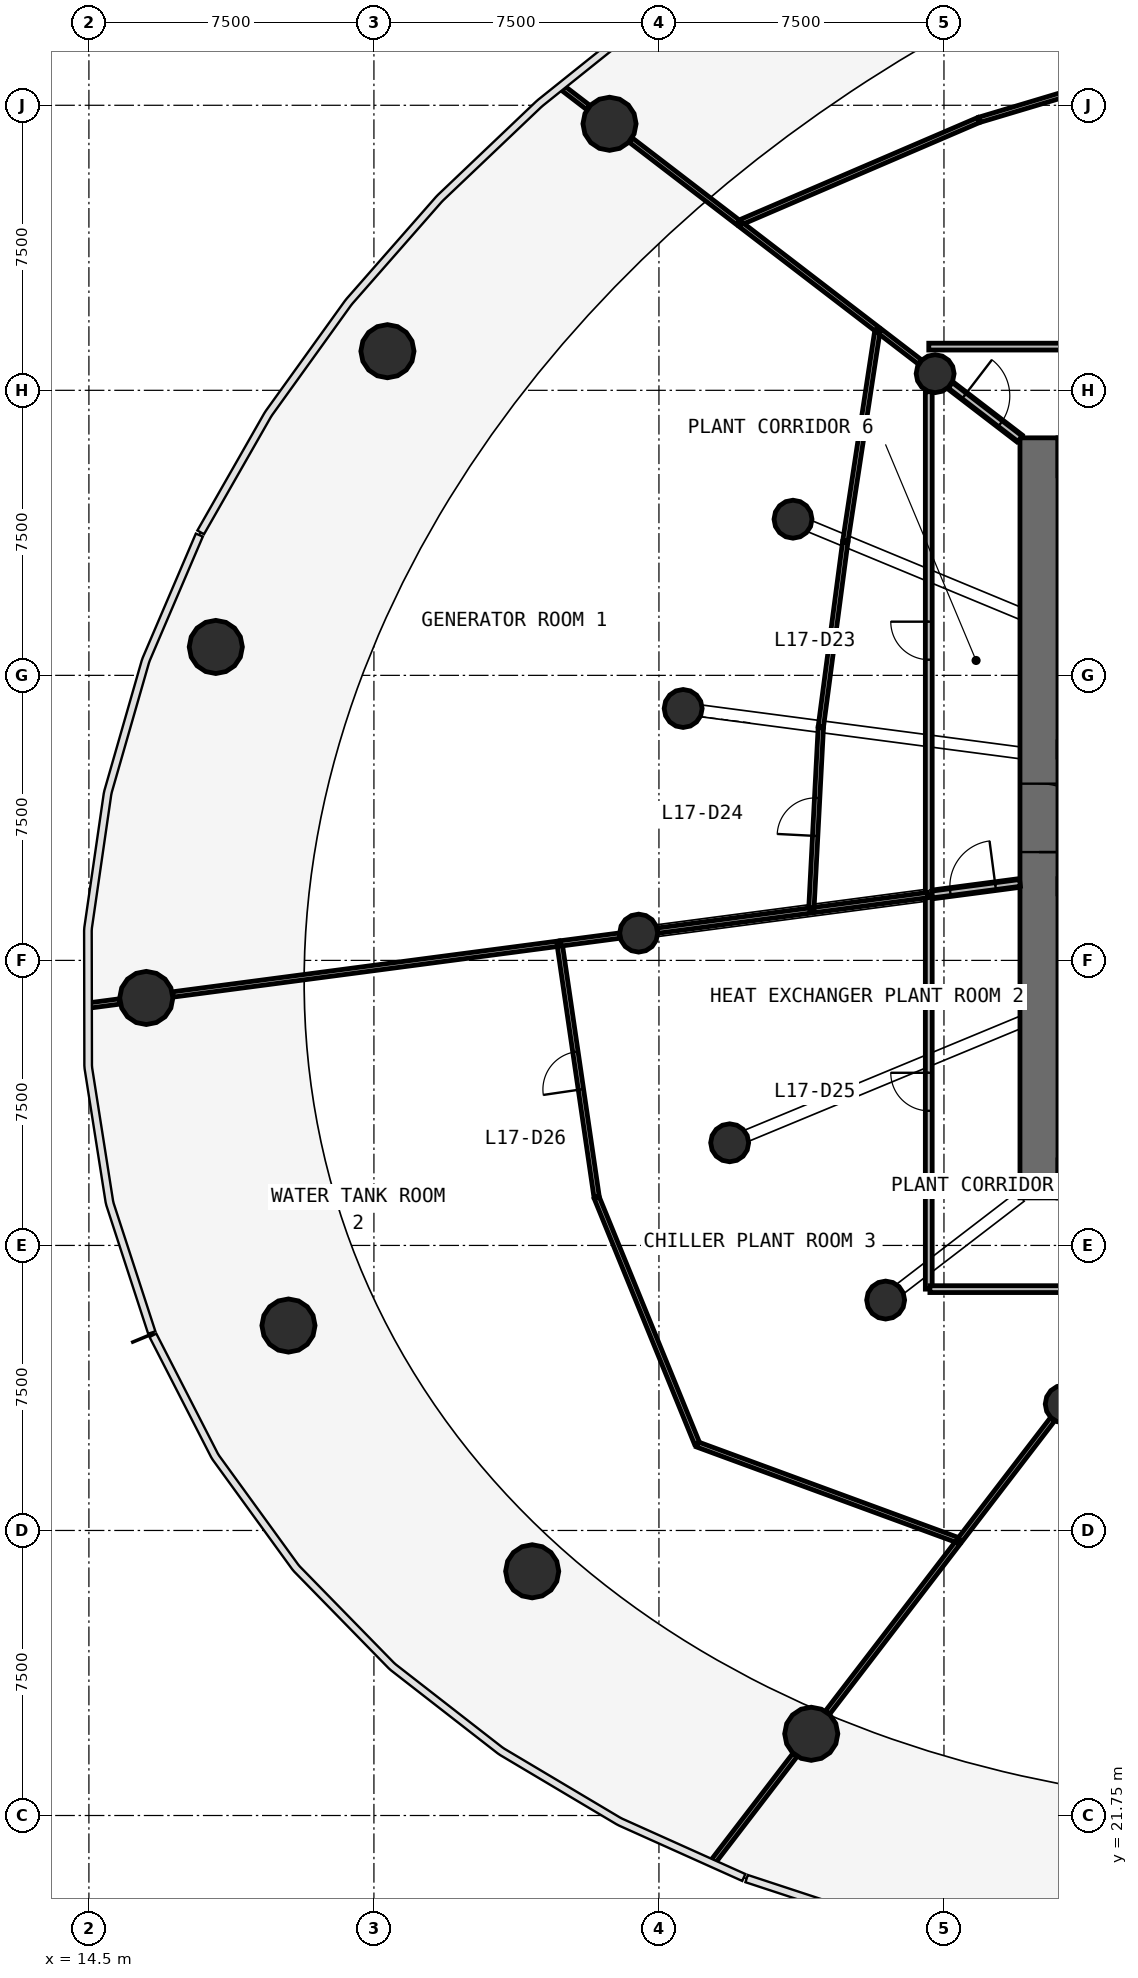
"""IFC4 building model, lengths in metres.
Left out: names, types, materials, properties, quantities, classifications, styles, units other than length and angle.
Written with IfcOpenShell. Run it as: python <this file> out.ifc"""

import sys

from ifc_helpers import new_model, si_unit, direction, frame, frame_2d, origin, origin_2d, place, context, subcontext, project, spatial, rectangle, circle, extrude, source, transform, mapped, element, fill, save


model = new_model("IFC4")
c1 = context("Model", 3, precision=1e-05, world=origin(), true_north=direction((0.0, 1.0)))
c2 = subcontext(c1, "Body", "Model", "MODEL_VIEW")
j1 = project(units=[si_unit("LENGTHUNIT", "METRE"), si_unit("PLANEANGLEUNIT", "RADIAN")], contexts=[c1])
p1 = place(None, origin())
s1 = spatial("IfcSite", under=j1, at=p1, CompositionType="ELEMENT")
p2 = place(p1, origin())
s2 = spatial("IfcBuilding", under=s1, at=p2, CompositionType="ELEMENT")
p3 = place(p2, frame((0.0, 0.0, 75.4)))
s3 = spatial("IfcBuildingStorey", under=s2, at=p3, CompositionType="ELEMENT", Elevation=75.4)
p4 = place(p3, frame((39.5, 58.0, 0.0), z_axis=(0.0, 0.0, 1.0), x_axis=(0.0, -1.0, 0.0)))
e1 = element("IfcWall", 1, at=p4, inside=s3, PredefinedType="SHEAR", context=c2, shape_type="SweptSolid", body=[
    extrude(rectangle(XDim=20.0, YDim=1.0, at=frame_2d((10.0, 0.0))), origin(), (0.0, 0.0, 1.0), 4.4),
])
p5 = place(p4, frame((9.1, 0.0, 0.0)))
e2 = element("IfcOpeningElement", 2, at=p5, cuts=e1, PredefinedType="OPENING", context=c2, shape_type="SweptSolid", body=[
    extrude(rectangle(XDim=1.8, YDim=2.1, at=frame_2d((0.9, 1.05))), frame((0.0, 0.51, 0.0), z_axis=(0.0, -1.0, 0.0), x_axis=(1.0, 0.0, 0.0)), (0.0, 0.0, 1.0), 1.02),
])
m1 = source(origin(), c2, "Body", "SweptSolid", [
    extrude(circle(Radius=0.7, at=origin_2d()), origin(), (0.0, 0.0, 1.0), 4.0),
])
for number, where, z_axis, x_axis in (
    (3, (28.199, 66.263, 0.0), (0.0, 0.0, 1.0), (1.0, 0.0, 0.0)),
    (4, (22.355, 60.279, 0.0), (0.0, 0.0, 1.0), (1.0, 0.0, 0.0)),
    (5, (17.839, 52.497, 0.0), (0.0, 0.0, 1.0), (1.0, 0.0, 0.0)),
    (6, (16.01, 43.262, 0.0), (0.0, 0.0, 1.0), (1.0, 0.0, 0.0)),
    (7, (19.751, 34.642, 0.0), (0.0, 0.0, 1.0), (1.0, 0.0, 0.0)),
    (8, (26.164, 28.176, 0.0), (0.0, 0.0, 1.0), (1.0, 0.0, 0.0)),
    (9, (33.508, 23.9, 0.0), (0.0, 0.0, 1.0), (1.0, 0.0, 0.0)),
):
    element("IfcColumn", number, at=place(p3, frame(where, z_axis=z_axis, x_axis=x_axis)), inside=s3, PredefinedType="COLUMN", context=c2, shape_type="MappedRepresentation", body=[
        mapped(m1, transform((0.0, 0.0, 0.0), scale=1.0)),
    ])
m2 = source(origin(), c2, "Body", "SweptSolid", [
    extrude(circle(Radius=0.5, at=origin_2d()), origin(), (0.0, 0.0, 1.0), 4.4),
])
for number, where, z_axis, x_axis in (
    (10, (36.768, 59.688, 0.0), (0.0, 0.0, 1.0), (1.0, 0.0, 0.0)),
    (11, (33.028, 55.859, 0.0), (0.0, 0.0, 1.0), (1.0, 0.0, 0.0)),
    (12, (30.137, 50.878, 0.0), (0.0, 0.0, 1.0), (1.0, 0.0, 0.0)),
    (13, (28.966, 44.968, 0.0), (0.0, 0.0, 1.0), (1.0, 0.0, 0.0)),
    (14, (31.361, 39.451, 0.0), (0.0, 0.0, 1.0), (1.0, 0.0, 0.0)),
    (15, (35.465, 35.312, 0.0), (0.0, 0.0, 1.0), (1.0, 0.0, 0.0)),
    (16, (40.165, 32.576, 0.0), (0.0, 0.0, 1.0), (1.0, 0.0, 0.0)),
):
    element("IfcColumn", number, at=place(p3, frame(where, z_axis=z_axis, x_axis=x_axis)), inside=s3, PredefinedType="COLUMN", context=c2, shape_type="MappedRepresentation", body=[
        mapped(m2, transform((0.0, 0.0, 0.0), scale=1.0)),
    ])
p6 = place(p3, frame((36.6, 60.4, 0.0), z_axis=(0.0, 0.0, 1.0), x_axis=(1.0, 0.0, 0.0)))
e17 = element("IfcWall", 17, at=p6, inside=s3, PredefinedType="PARTITIONING", context=c2, shape_type="SweptSolid", body=[
    extrude(rectangle(XDim=13.767, YDim=0.18, at=frame_2d((6.884, 0.0))), origin(), (0.0, 0.0, 1.0), 2.8),
])
p7 = place(p6, frame((6.317, 0.0, 0.0)))
e18 = element("IfcOpeningElement", 18, at=p7, cuts=e17, PredefinedType="OPENING", context=c2, shape_type="SweptSolid", body=[
    extrude(rectangle(XDim=1.0, YDim=2.1, at=frame_2d((0.5, 1.05))), frame((0.0, 0.1, 0.0), z_axis=(0.0, -1.0, 0.0), x_axis=(1.0, 0.0, 0.0)), (0.0, 0.0, 1.0), 0.2),
])
p8 = place(p3, frame((36.6, 45.973, 0.0), z_axis=(0.0, 0.0, 1.0), x_axis=(0.0, 1.0, 0.0)))
e19 = element("IfcWall", 19, at=p8, inside=s3, PredefinedType="PARTITIONING", context=c2, shape_type="SweptSolid", body=[
    extrude(rectangle(XDim=13.24, YDim=0.18, at=frame_2d((6.62, 0.0))), origin(), (0.0, 0.0, 1.0), 2.8),
])
p9 = place(p8, frame((6.19, 0.0, 0.0)))
e20 = element("IfcOpeningElement", 20, at=p9, cuts=e19, PredefinedType="OPENING", context=c2, shape_type="SweptSolid", body=[
    extrude(rectangle(XDim=1.0, YDim=2.1, at=frame_2d((0.5, 1.05))), frame((0.0, 0.1, 0.0), z_axis=(0.0, -1.0, 0.0), x_axis=(1.0, 0.0, 0.0)), (0.0, 0.0, 1.0), 0.2),
])
p10 = place(p3, frame((36.6, 35.6, 0.0), z_axis=(0.0, 0.0, 1.0), x_axis=(0.0, 1.0, 0.0)))
e21 = element("IfcWall", 21, at=p10, inside=s3, PredefinedType="PARTITIONING", context=c2, shape_type="SweptSolid", body=[
    extrude(rectangle(XDim=10.343, YDim=0.18, at=frame_2d((5.171, 0.0))), origin(), (0.0, 0.0, 1.0), 2.8),
])
p11 = place(p10, frame((4.693, 0.0, 0.0)))
e22 = element("IfcOpeningElement", 22, at=p11, cuts=e21, PredefinedType="OPENING", context=c2, shape_type="SweptSolid", body=[
    extrude(rectangle(XDim=1.0, YDim=2.1, at=frame_2d((0.5, 1.05))), frame((0.0, 0.1, 0.0), z_axis=(0.0, -1.0, 0.0), x_axis=(1.0, 0.0, 0.0)), (0.0, 0.0, 1.0), 0.2),
])
p12 = place(p3, frame((36.63, 35.6, 0.0), z_axis=(0.0, 0.0, 1.0), x_axis=(1.0, 0.0, 0.0)))
e23 = element("IfcWall", 23, at=p12, inside=s3, PredefinedType="PARTITIONING", context=c2, shape_type="SweptSolid", body=[
    extrude(rectangle(XDim=5.825, YDim=0.18, at=frame_2d((2.913, 0.0))), origin(), (0.0, 0.0, 1.0), 2.8),
])
p13 = place(p3, frame((36.69, 45.984, 0.0), z_axis=(0.0, 0.0, 1.0), x_axis=(0.991440737811, 0.130557509967, 0.0)))
e24 = element("IfcWall", 24, at=p13, inside=s3, PredefinedType="PARTITIONING", context=c2, shape_type="SweptSolid", body=[
    extrude(rectangle(XDim=2.33, YDim=0.18, at=frame_2d((1.165, 0.0))), origin(), (0.0, 0.0, 1.0), 2.8),
])
p14 = place(p13, frame((0.48, 0.0, 0.0)))
e25 = element("IfcOpeningElement", 25, at=p14, cuts=e24, PredefinedType="OPENING", context=c2, shape_type="SweptSolid", body=[
    extrude(rectangle(XDim=1.2, YDim=2.1, at=frame_2d((0.6, 1.05))), frame((0.0, 0.1, 0.0), z_axis=(0.0, -1.0, 0.0), x_axis=(1.0, 0.0, 0.0)), (0.0, 0.0, 1.0), 0.2),
])
p15 = place(p3, frame((37.168, 59.381, 0.0), z_axis=(0.0, 0.0, 1.0), x_axis=(0.793393624489, -0.608708926023, 0.0)))
e26 = element("IfcWall", 26, at=p15, inside=s3, PredefinedType="PARTITIONING", context=c2, shape_type="SweptSolid", body=[
    extrude(rectangle(XDim=2.309, YDim=0.18, at=frame_2d((1.155, 0.0))), origin(), (0.0, 0.0, 1.0), 2.8),
])
p16 = place(p15, frame((0.459, 0.0, 0.0)))
e27 = element("IfcOpeningElement", 27, at=p16, cuts=e26, PredefinedType="OPENING", context=c2, shape_type="SweptSolid", body=[
    extrude(rectangle(XDim=1.2, YDim=2.1, at=frame_2d((0.6, 1.05))), frame((0.0, 0.1, 0.0), z_axis=(0.0, -1.0, 0.0), x_axis=(1.0, 0.0, 0.0)), (0.0, 0.0, 1.0), 0.2),
])
p17 = place(p3, frame((26.885, 44.694, 0.0), z_axis=(0.0, 0.0, 1.0), x_axis=(-0.991445064554, -0.130524648905, 0.0)))
e28 = element("IfcWall", 28, at=p17, inside=s3, PredefinedType="PARTITIONING", context=c2, shape_type="SweptSolid", body=[
    extrude(rectangle(XDim=10.265, YDim=0.14, at=frame_2d((5.133, 0.0))), origin(), (0.0, 0.0, 1.0), 2.8),
])
p18 = place(p3, frame((30.513, 31.513, 0.0), z_axis=(0.0, 0.0, 1.0), x_axis=(0.938632857677, -0.344917901085, 0.0)))
e29 = element("IfcWall", 29, at=p18, inside=s3, PredefinedType="PARTITIONING", context=c2, shape_type="SweptSolid", body=[
    extrude(rectangle(XDim=7.343, YDim=0.14, at=frame_2d((3.671, 0.0))), origin(), (0.0, 0.0, 1.0), 2.8),
])
p19 = place(p3, frame((27.864, 38.002, 0.0), z_axis=(0.0, 0.0, 1.0), x_axis=(0.377966751533, -0.925819169566, 0.0)))
e30 = element("IfcWall", 30, at=p19, inside=s3, PredefinedType="PARTITIONING", context=c2, shape_type="SweptSolid", body=[
    extrude(rectangle(XDim=6.98, YDim=0.14, at=frame_2d((3.49, 0.0))), origin(), (0.0, 0.0, 1.0), 2.8),
])
p20 = place(p3, frame((37.911, 66.362, 0.0), z_axis=(0.0, 0.0, 1.0), x_axis=(-0.918844976154, -0.394618689112, 0.0)))
e31 = element("IfcWall", 31, at=p20, inside=s3, PredefinedType="PARTITIONING", context=c2, shape_type="SweptSolid", body=[
    extrude(rectangle(XDim=6.866, YDim=0.14, at=frame_2d((3.433, 0.0))), origin(), (0.0, 0.0, 1.0), 2.8),
])
p21 = place(p3, frame((27.859, 38.032, 0.0), z_axis=(0.0, 0.0, 1.0), x_axis=(-0.144720027083, 0.989472644271, 0.0)))
e32 = element("IfcWall", 32, at=p21, inside=s3, PredefinedType="PARTITIONING", context=c2, shape_type="SweptSolid", body=[
    extrude(rectangle(XDim=6.702, YDim=0.14, at=frame_2d((3.351, 0.0))), origin(), (0.0, 0.0, 1.0), 2.8),
])
p22 = place(p21, frame((2.852, 0.0, 0.0)))
e33 = element("IfcOpeningElement", 33, at=p22, cuts=e32, PredefinedType="OPENING", context=c2, shape_type="SweptSolid", body=[
    extrude(rectangle(XDim=1.0, YDim=2.1, at=frame_2d((0.5, 1.05))), frame((0.0, 0.08, 0.0), z_axis=(0.0, -1.0, 0.0), x_axis=(1.0, 0.0, 0.0)), (0.0, 0.0, 1.0), 0.16),
])
p23 = place(p3, frame((43.679, 68.089, 0.0), z_axis=(0.0, 0.0, 1.0), x_axis=(-0.957979800039, -0.286835671976, 0.0)))
e34 = element("IfcWall", 34, at=p23, inside=s3, PredefinedType="PARTITIONING", context=c2, shape_type="SweptSolid", body=[
    extrude(rectangle(XDim=5.991, YDim=0.14, at=frame_2d((2.996, 0.0))), origin(), (0.0, 0.0, 1.0), 2.8),
])
p24 = place(p3, frame((37.361, 28.922, 0.0), z_axis=(0.0, 0.0, 1.0), x_axis=(-0.608768603858, -0.793347834784, 0.0)))
e35 = element("IfcWall", 35, at=p24, inside=s3, PredefinedType="PARTITIONING", context=c2, shape_type="SweptSolid", body=[
    extrude(rectangle(XDim=5.625, YDim=0.14, at=frame_2d((2.813, 0.0))), origin(), (0.0, 0.0, 1.0), 2.8),
])
p25 = place(p3, frame((35.254, 60.849, 0.0), z_axis=(0.0, 0.0, 1.0), x_axis=(-0.150752706643, -0.988571505476, 0.0)))
e36 = element("IfcWall", 36, at=p25, inside=s3, PredefinedType="PARTITIONING", context=c2, shape_type="SweptSolid", body=[
    extrude(rectangle(XDim=5.626, YDim=0.14, at=frame_2d((2.813, 0.0))), origin(), (0.0, 0.0, 1.0), 2.8),
])
p26 = place(p3, frame((34.402, 55.258, 0.0), z_axis=(0.0, 0.0, 1.0), x_axis=(-0.131024321146, -0.991379154142, 0.0)))
e37 = element("IfcWall", 37, at=p26, inside=s3, PredefinedType="PARTITIONING", context=c2, shape_type="SweptSolid", body=[
    extrude(rectangle(XDim=4.899, YDim=0.14, at=frame_2d((2.449, 0.0))), origin(), (0.0, 0.0, 1.0), 2.8),
])
p27 = place(p3, frame((33.509, 45.566, 0.0), z_axis=(0.0, 0.0, 1.0), x_axis=(0.052002293209, 0.998646965399, 0.0)))
e38 = element("IfcWall", 38, at=p27, inside=s3, PredefinedType="PARTITIONING", context=c2, shape_type="SweptSolid", body=[
    extrude(rectangle(XDim=4.812, YDim=0.14, at=frame_2d((2.406, 0.0))), origin(), (0.0, 0.0, 1.0), 2.8),
])
p28 = place(p27, frame((1.962, 0.0, 0.0)))
e39 = element("IfcOpeningElement", 39, at=p28, cuts=e38, PredefinedType="OPENING", context=c2, shape_type="SweptSolid", body=[
    extrude(rectangle(XDim=1.0, YDim=2.1, at=frame_2d((0.5, 1.05))), frame((0.0, 0.08, 0.0), z_axis=(0.0, -1.0, 0.0), x_axis=(1.0, 0.0, 0.0)), (0.0, 0.0, 1.0), 0.16),
])
p29 = place(p3, frame((35.231, 60.868, 0.0), z_axis=(0.0, 0.0, 1.0), x_axis=(-0.79336058226, 0.608751990976, 0.0)))
e40 = element("IfcWall", 40, at=p29, inside=s3, PredefinedType="PARTITIONING", context=c2, shape_type="SweptSolid", body=[
    extrude(rectangle(XDim=4.494, YDim=0.14, at=frame_2d((2.247, 0.0))), origin(), (0.0, 0.0, 1.0), 2.8),
])
p30 = place(p3, frame((33.479, 45.562, 0.0), z_axis=(0.0, 0.0, 1.0), x_axis=(-0.991444643615, -0.130527846248, 0.0)))
e41 = element("IfcWall", 41, at=p30, inside=s3, PredefinedType="PARTITIONING", context=c2, shape_type="SweptSolid", body=[
    extrude(rectangle(XDim=4.048, YDim=0.14, at=frame_2d((2.024, 0.0))), origin(), (0.0, 0.0, 1.0), 2.8),
])
p31 = place(p3, frame((39.858, 32.176, 0.0), z_axis=(0.0, 0.0, 1.0), x_axis=(-0.608766057901, -0.793349788396, 0.0)))
e42 = element("IfcWall", 42, at=p31, inside=s3, PredefinedType="PARTITIONING", context=c2, shape_type="SweptSolid", body=[
    extrude(rectangle(XDim=3.998, YDim=0.14, at=frame_2d((1.999, 0.0))), origin(), (0.0, 0.0, 1.0), 2.8),
])
p32 = place(p3, frame((31.578, 63.67, 0.0), z_axis=(0.0, 0.0, 1.0), x_axis=(-0.793366411032, 0.608744394509, 0.0)))
e43 = element("IfcWall", 43, at=p32, inside=s3, PredefinedType="PARTITIONING", context=c2, shape_type="SweptSolid", body=[
    extrude(rectangle(XDim=3.554, YDim=0.14, at=frame_2d((1.777, 0.0))), origin(), (0.0, 0.0, 1.0), 2.8),
])
p33 = place(p3, frame((33.079, 23.342, 0.0), z_axis=(0.0, 0.0, 1.0), x_axis=(-0.608803527611, -0.793321035123, 0.0)))
e44 = element("IfcWall", 44, at=p33, inside=s3, PredefinedType="PARTITIONING", context=c2, shape_type="SweptSolid", body=[
    extrude(rectangle(XDim=3.513, YDim=0.14, at=frame_2d((1.756, 0.0))), origin(), (0.0, 0.0, 1.0), 3.1),
])
p34 = place(p3, frame((36.57, 45.969, 0.0), z_axis=(0.0, 0.0, 1.0), x_axis=(-0.991452642606, -0.130467074276, 0.0)))
e45 = element("IfcWall", 45, at=p34, inside=s3, PredefinedType="PARTITIONING", context=c2, shape_type="SweptSolid", body=[
    extrude(rectangle(XDim=3.017, YDim=0.14, at=frame_2d((1.508, 0.0))), origin(), (0.0, 0.0, 1.0), 2.8),
])
p35 = place(p3, frame((28.466, 44.902, 0.0), z_axis=(0.0, 0.0, 1.0), x_axis=(-0.991455357704, -0.130446439887, 0.0)))
e46 = element("IfcWall", 46, at=p35, inside=s3, PredefinedType="PARTITIONING", context=c2, shape_type="SweptSolid", body=[
    extrude(rectangle(XDim=1.565, YDim=0.14, at=frame_2d((0.782, 0.0))), origin(), (0.0, 0.0, 1.0), 2.8),
])
p36 = place(p3, frame((36.367, 59.995, 0.0), z_axis=(0.0, 0.0, 1.0), x_axis=(-0.793330053211, 0.608791776121, 0.0)))
e47 = element("IfcWall", 47, at=p36, inside=s3, PredefinedType="PARTITIONING", context=c2, shape_type="SweptSolid", body=[
    extrude(rectangle(XDim=1.323, YDim=0.14, at=frame_2d((0.662, 0.0))), origin(), (0.0, 0.0, 1.0), 2.8),
])
p37 = place(p3, frame((27.641, 66.691, 0.0), z_axis=(0.0, 0.0, 1.0), x_axis=(-0.793252635304, 0.608892647832, 0.0)))
e48 = element("IfcWall", 48, at=p37, inside=s3, PredefinedType="PARTITIONING", context=c2, shape_type="SweptSolid", body=[
    extrude(rectangle(XDim=0.822, YDim=0.14, at=frame_2d((0.411, 0.0))), origin(), (0.0, 0.0, 1.0), 3.1),
])
p38 = place(p3, frame((15.311, 43.17, 0.0), z_axis=(0.0, 0.0, 1.0), x_axis=(-0.991421968508, -0.130699963122, 0.0)))
e49 = element("IfcWall", 49, at=p38, inside=s3, PredefinedType="PARTITIONING", context=c2, shape_type="SweptSolid", body=[
    extrude(rectangle(XDim=0.798, YDim=0.14, at=frame_2d((0.399, 0.0))), origin(), (0.0, 0.0, 1.0), 3.1),
])
m3 = source(origin(), c2, "Body", "SweptSolid", [
    extrude(rectangle(XDim=1.8, YDim=2.1, at=frame_2d((0.9, 1.05))), frame((0.0, 0.025, 0.0), z_axis=(0.0, -1.0, 0.0), x_axis=(1.0, 0.0, 0.0)), (0.0, 0.0, 1.0), 0.05),
])
p39 = place(p5, origin())
e50 = element("IfcDoor", 50, at=p39, inside=s3, OperationType="SINGLE_SWING_RIGHT", PredefinedType="DOOR", context=c2, shape_type="MappedRepresentation", body=[
    mapped(m3, transform((0.0, 0.0, 0.0), scale=1.0)),
])
fill(e2, e50)
m4 = source(origin(), c2, "Body", "SweptSolid", [
    extrude(rectangle(XDim=1.0, YDim=2.1, at=frame_2d((0.5, 1.05))), frame((0.0, 0.025, 0.0), z_axis=(0.0, -1.0, 0.0), x_axis=(1.0, 0.0, 0.0)), (0.0, 0.0, 1.0), 0.05),
])
p40 = place(p9, origin())
e51 = element("IfcDoor", 51, at=p40, inside=s3, OperationType="SINGLE_SWING_RIGHT", PredefinedType="DOOR", context=c2, shape_type="MappedRepresentation", body=[
    mapped(m4, transform((0.0, 0.0, 0.0), scale=1.0)),
])
fill(e20, e51)
p41 = place(p28, origin())
e52 = element("IfcDoor", 52, at=p41, inside=s3, OperationType="SINGLE_SWING_LEFT", PredefinedType="DOOR", context=c2, shape_type="MappedRepresentation", body=[
    mapped(m4, transform((0.0, 0.0, 0.0), scale=1.0)),
])
fill(e39, e52)
p42 = place(p11, origin())
e53 = element("IfcDoor", 53, at=p42, inside=s3, OperationType="SINGLE_SWING_RIGHT", PredefinedType="DOOR", context=c2, shape_type="MappedRepresentation", body=[
    mapped(m4, transform((0.0, 0.0, 0.0), scale=1.0)),
])
fill(e22, e53)
p43 = place(p22, origin())
e54 = element("IfcDoor", 54, at=p43, inside=s3, OperationType="SINGLE_SWING_LEFT", PredefinedType="DOOR", context=c2, shape_type="MappedRepresentation", body=[
    mapped(m4, transform((0.0, 0.0, 0.0), scale=1.0)),
])
fill(e33, e54)
m5 = source(origin(), c2, "Body", "SweptSolid", [
    extrude(rectangle(XDim=1.2, YDim=2.1, at=frame_2d((0.6, 1.05))), frame((0.0, 0.025, 0.0), z_axis=(0.0, -1.0, 0.0), x_axis=(1.0, 0.0, 0.0)), (0.0, 0.0, 1.0), 0.05),
])
p44 = place(p16, origin())
e55 = element("IfcDoor", 55, at=p44, inside=s3, OperationType="SINGLE_SWING_LEFT", PredefinedType="DOOR", context=c2, shape_type="MappedRepresentation", body=[
    mapped(m5, transform((0.0, 0.0, 0.0), scale=1.0)),
])
fill(e27, e55)
p45 = place(p14, origin())
e56 = element("IfcDoor", 56, at=p45, inside=s3, OperationType="SINGLE_SWING_RIGHT", PredefinedType="DOOR", context=c2, shape_type="MappedRepresentation", body=[
    mapped(m5, transform((0.0, 0.0, 0.0), scale=1.0)),
])
fill(e25, e56)
save(model, sys.argv[1])
